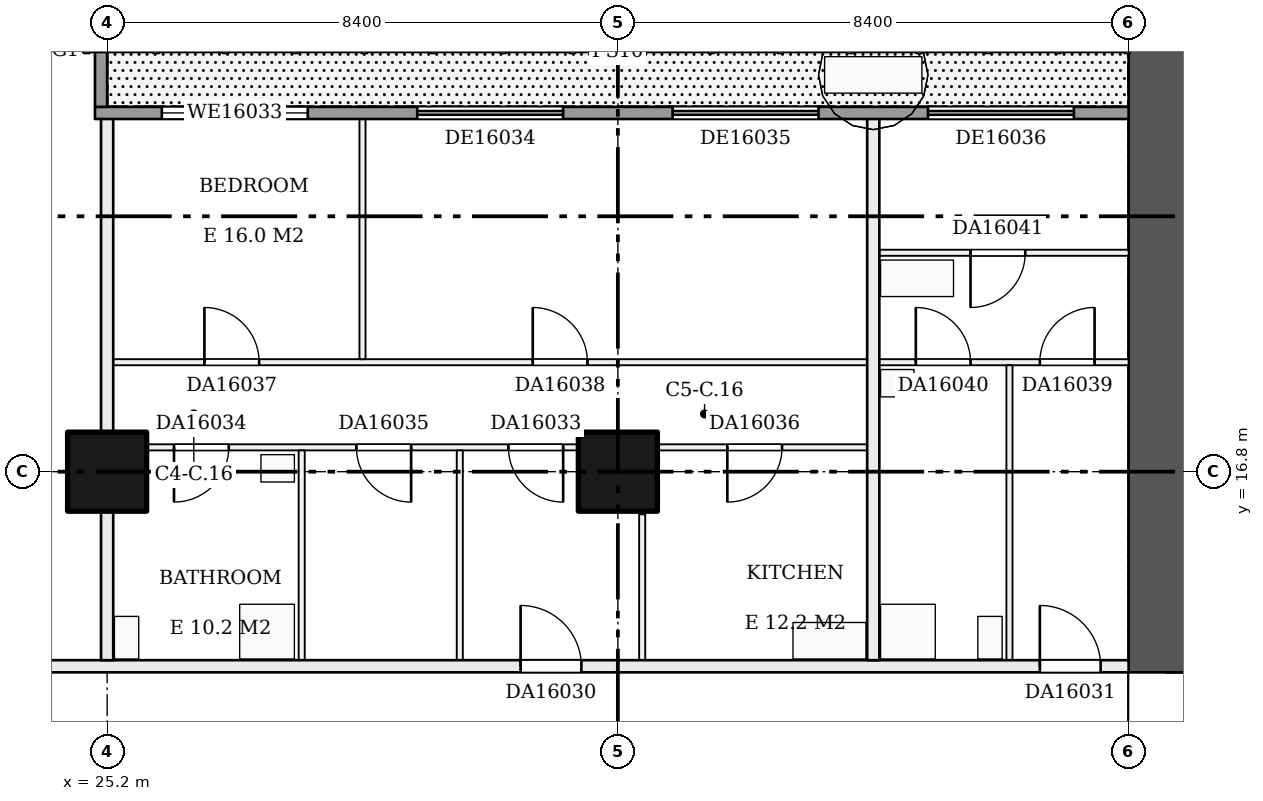
"""IFC4 building model, lengths in metres.
Left out: names, types, materials, properties, quantities, classifications, styles, units other than length and angle.
Written with IfcOpenShell. Run it as: python <this file> out.ifc"""

import sys

from ifc_helpers import new_model, si_unit, direction, frame, frame_2d, origin, origin_2d, place, context, subcontext, project, spatial, rectangle, extrude, element, fill, save


model = new_model("IFC4")
c1 = context("Model", 3, precision=1e-05, world=origin(), true_north=direction((0.0, 1.0)))
c2 = subcontext(c1, "Body", "Model", "MODEL_VIEW")
j1 = project(units=[si_unit("LENGTHUNIT", "METRE"), si_unit("PLANEANGLEUNIT", "RADIAN")], contexts=[c1])
p1 = place(None, origin())
s1 = spatial("IfcSite", under=j1, at=p1, CompositionType="ELEMENT")
p2 = place(p1, origin())
s2 = spatial("IfcBuilding", under=s1, at=p2, CompositionType="ELEMENT")
p3 = place(p2, frame((0.0, 0.0, 67.2)))
s3 = spatial("IfcBuildingStorey", under=s2, at=p3, CompositionType="ELEMENT", Elevation=67.2)
for number, where, z_axis, x_axis in (
    (1, (25.2, 16.8, 0.0), (0.0, 0.0, 1.0), (1.0, 0.0, 0.0)),
    (2, (33.6, 16.8, 0.0), (0.0, 0.0, 1.0), (1.0, 0.0, 0.0)),
):
    element("IfcColumn", number, at=place(p3, frame(where, z_axis=z_axis, x_axis=x_axis)), inside=s3, PredefinedType="COLUMN", context=c2, shape_type="SweptSolid", body=[
        extrude(rectangle(XDim=1.3, YDim=1.3, at=origin_2d()), origin(), (0.0, 0.0, 1.0), 3.22),
    ])
p4 = place(p3, frame((42.6, 9.6, 0.0), z_axis=(0.0, 0.0, 1.0), x_axis=(0.0, 1.0, 0.0)))
e3 = element("IfcWall", 3, at=p4, inside=s3, PredefinedType="SHEAR", context=c2, shape_type="SweptSolid", body=[
    extrude(rectangle(XDim=14.4, YDim=1.2, at=frame_2d((7.2, 0.0))), origin(), (0.0, 0.0, 1.0), 3.22),
])
p5 = place(p4, frame((2.1, 0.0, 0.0)))
e4 = element("IfcOpeningElement", 4, at=p5, cuts=e3, PredefinedType="OPENING", context=c2, shape_type="SweptSolid", body=[
    extrude(rectangle(XDim=1.8, YDim=2.1, at=frame_2d((0.9, 1.05))), frame((0.0, 0.61, 0.0), z_axis=(0.0, -1.0, 0.0), x_axis=(1.0, 0.0, 0.0)), (0.0, 0.0, 1.0), 1.22),
])
p6 = place(p3, frame((16.9, 13.6, 0.0), z_axis=(0.0, 0.0, 1.0), x_axis=(1.0, 0.0, 0.0)))
e5 = element("IfcWall", 5, at=p6, inside=s3, PredefinedType="PARTITIONING", context=c2, shape_type="SweptSolid", body=[
    extrude(rectangle(XDim=25.1, YDim=0.2, at=frame_2d((12.55, 0.0))), origin(), (0.0, 0.0, 1.0), 3.22),
])
p7 = place(p6, frame((15.1, 0.0, 0.0)))
e6 = element("IfcOpeningElement", 6, at=p7, cuts=e5, PredefinedType="OPENING", context=c2, shape_type="SweptSolid", body=[
    extrude(rectangle(XDim=1.0, YDim=2.1, at=frame_2d((0.5, 1.05))), frame((0.0, 0.11, 0.0), z_axis=(0.0, -1.0, 0.0), x_axis=(1.0, 0.0, 0.0)), (0.0, 0.0, 1.0), 0.22),
])
p8 = place(p6, frame((23.64, 0.0, 0.0)))
e7 = element("IfcOpeningElement", 7, at=p8, cuts=e5, PredefinedType="OPENING", context=c2, shape_type="SweptSolid", body=[
    extrude(rectangle(XDim=1.0, YDim=2.1, at=frame_2d((0.5, 1.05))), frame((0.0, 0.11, 0.0), z_axis=(0.0, -1.0, 0.0), x_axis=(1.0, 0.0, 0.0)), (0.0, 0.0, 1.0), 0.22),
])
p9 = place(p6, frame((5.2, 0.0, 0.0)))
e8 = element("IfcOpeningElement", 8, at=p9, cuts=e5, PredefinedType="OPENING", context=c2, shape_type="SweptSolid", body=[
    extrude(rectangle(XDim=1.0, YDim=2.1, at=frame_2d((0.5, 1.05))), frame((0.0, 0.11, 0.0), z_axis=(0.0, -1.0, 0.0), x_axis=(1.0, 0.0, 0.0)), (0.0, 0.0, 1.0), 0.22),
])
p10 = place(p3, frame((25.3, 17.2, 0.0), z_axis=(0.0, 0.0, 1.0), x_axis=(1.0, 0.0, 0.0)))
e9 = element("IfcWall", 9, at=p10, inside=s3, PredefinedType="PARTITIONING", context=c2, shape_type="SweptSolid", body=[
    extrude(rectangle(XDim=12.4, YDim=0.1, at=frame_2d((6.2, 0.0))), origin(), (0.0, 0.0, 1.0), 3.22),
])
p11 = place(p10, frame((6.5, 0.0, 0.0)))
e10 = element("IfcOpeningElement", 10, at=p11, cuts=e9, PredefinedType="OPENING", context=c2, shape_type="SweptSolid", body=[
    extrude(rectangle(XDim=0.9, YDim=2.1, at=frame_2d((0.45, 1.05))), frame((0.0, 0.06, 0.0), z_axis=(0.0, -1.0, 0.0), x_axis=(1.0, 0.0, 0.0)), (0.0, 0.0, 1.0), 0.12),
])
p12 = place(p10, frame((1.0, 0.0, 0.0)))
e11 = element("IfcOpeningElement", 11, at=p12, cuts=e9, PredefinedType="OPENING", context=c2, shape_type="SweptSolid", body=[
    extrude(rectangle(XDim=0.9, YDim=2.1, at=frame_2d((0.45, 1.05))), frame((0.0, 0.06, 0.0), z_axis=(0.0, -1.0, 0.0), x_axis=(1.0, 0.0, 0.0)), (0.0, 0.0, 1.0), 0.12),
])
p13 = place(p10, frame((4.0, 0.0, 0.0)))
e12 = element("IfcOpeningElement", 12, at=p13, cuts=e9, PredefinedType="OPENING", context=c2, shape_type="SweptSolid", body=[
    extrude(rectangle(XDim=0.9, YDim=2.1, at=frame_2d((0.45, 1.05))), frame((0.0, 0.06, 0.0), z_axis=(0.0, -1.0, 0.0), x_axis=(1.0, 0.0, 0.0)), (0.0, 0.0, 1.0), 0.12),
])
p14 = place(p10, frame((10.1, 0.0, 0.0)))
e13 = element("IfcOpeningElement", 13, at=p14, cuts=e9, PredefinedType="OPENING", context=c2, shape_type="SweptSolid", body=[
    extrude(rectangle(XDim=0.9, YDim=2.1, at=frame_2d((0.45, 1.05))), frame((0.0, 0.06, 0.0), z_axis=(0.0, -1.0, 0.0), x_axis=(1.0, 0.0, 0.0)), (0.0, 0.0, 1.0), 0.12),
])
p15 = place(p3, frame((25.3, 18.6, 0.0), z_axis=(0.0, 0.0, 1.0), x_axis=(1.0, 0.0, 0.0)))
e14 = element("IfcWall", 14, at=p15, inside=s3, PredefinedType="PARTITIONING", context=c2, shape_type="SweptSolid", body=[
    extrude(rectangle(XDim=16.7, YDim=0.1, at=frame_2d((8.35, 0.0))), origin(), (0.0, 0.0, 1.0), 3.22),
])
p16 = place(p15, frame((1.5, 0.0, 0.0)))
e15 = element("IfcOpeningElement", 15, at=p16, cuts=e14, PredefinedType="OPENING", context=c2, shape_type="SweptSolid", body=[
    extrude(rectangle(XDim=0.9, YDim=2.1, at=frame_2d((0.45, 1.05))), frame((0.0, 0.06, 0.0), z_axis=(0.0, -1.0, 0.0), x_axis=(1.0, 0.0, 0.0)), (0.0, 0.0, 1.0), 0.12),
])
p17 = place(p15, frame((6.9, 0.0, 0.0)))
e16 = element("IfcOpeningElement", 16, at=p17, cuts=e14, PredefinedType="OPENING", context=c2, shape_type="SweptSolid", body=[
    extrude(rectangle(XDim=0.9, YDim=2.1, at=frame_2d((0.45, 1.05))), frame((0.0, 0.06, 0.0), z_axis=(0.0, -1.0, 0.0), x_axis=(1.0, 0.0, 0.0)), (0.0, 0.0, 1.0), 0.12),
])
p18 = place(p15, frame((15.24, 0.0, 0.0)))
e17 = element("IfcOpeningElement", 17, at=p18, cuts=e14, PredefinedType="OPENING", context=c2, shape_type="SweptSolid", body=[
    extrude(rectangle(XDim=0.9, YDim=2.1, at=frame_2d((0.45, 1.05))), frame((0.0, 0.06, 0.0), z_axis=(0.0, -1.0, 0.0), x_axis=(1.0, 0.0, 0.0)), (0.0, 0.0, 1.0), 0.12),
])
p19 = place(p15, frame((13.2, 0.0, 0.0)))
e18 = element("IfcOpeningElement", 18, at=p19, cuts=e14, PredefinedType="OPENING", context=c2, shape_type="SweptSolid", body=[
    extrude(rectangle(XDim=0.9, YDim=2.1, at=frame_2d((0.45, 1.05))), frame((0.0, 0.06, 0.0), z_axis=(0.0, -1.0, 0.0), x_axis=(1.0, 0.0, 0.0)), (0.0, 0.0, 1.0), 0.12),
])
p20 = place(p3, frame((37.9, 20.4, 0.0), z_axis=(0.0, 0.0, 1.0), x_axis=(1.0, 0.0, 0.0)))
e19 = element("IfcWall", 19, at=p20, inside=s3, PredefinedType="PARTITIONING", context=c2, shape_type="SweptSolid", body=[
    extrude(rectangle(XDim=4.1, YDim=0.1, at=frame_2d((2.05, 0.0))), origin(), (0.0, 0.0, 1.0), 3.22),
])
p21 = place(p20, frame((1.5, 0.0, 0.0)))
e20 = element("IfcOpeningElement", 20, at=p21, cuts=e19, PredefinedType="OPENING", context=c2, shape_type="SweptSolid", body=[
    extrude(rectangle(XDim=0.9, YDim=2.1, at=frame_2d((0.45, 1.05))), frame((0.0, 0.06, 0.0), z_axis=(0.0, -1.0, 0.0), x_axis=(1.0, 0.0, 0.0)), (0.0, 0.0, 1.0), 0.12),
])
p22 = place(p3, frame((25.2, 13.7, 0.0), z_axis=(0.0, 0.0, 1.0), x_axis=(0.0, 1.0, 0.0)))
e21 = element("IfcWall", 21, at=p22, inside=s3, PredefinedType="PARTITIONING", context=c2, shape_type="SweptSolid", body=[
    extrude(rectangle(XDim=9.0, YDim=0.2, at=frame_2d((4.5, 0.0))), origin(), (0.0, 0.0, 1.0), 3.22),
])
p23 = place(p3, frame((28.4, 13.7, 0.0), z_axis=(0.0, 0.0, 1.0), x_axis=(0.0, 1.0, 0.0)))
e22 = element("IfcWall", 22, at=p23, inside=s3, PredefinedType="PARTITIONING", context=c2, shape_type="SweptSolid", body=[
    extrude(rectangle(XDim=3.45, YDim=0.1, at=frame_2d((1.725, 0.0))), origin(), (0.0, 0.0, 1.0), 3.22),
])
p24 = place(p3, frame((29.4, 18.65, 0.0), z_axis=(0.0, 0.0, 1.0), x_axis=(0.0, 1.0, 0.0)))
e23 = element("IfcWall", 23, at=p24, inside=s3, PredefinedType="PARTITIONING", context=c2, shape_type="SweptSolid", body=[
    extrude(rectangle(XDim=4.05, YDim=0.1, at=frame_2d((2.025, 0.0))), origin(), (0.0, 0.0, 1.0), 3.22),
])
p25 = place(p3, frame((31.0, 13.7, 0.0), z_axis=(0.0, 0.0, 1.0), x_axis=(0.0, 1.0, 0.0)))
e24 = element("IfcWall", 24, at=p25, inside=s3, PredefinedType="PARTITIONING", context=c2, shape_type="SweptSolid", body=[
    extrude(rectangle(XDim=3.45, YDim=0.1, at=frame_2d((1.725, 0.0))), origin(), (0.0, 0.0, 1.0), 3.22),
])
p26 = place(p3, frame((34.0, 13.7, 0.0), z_axis=(0.0, 0.0, 1.0), x_axis=(0.0, 1.0, 0.0)))
e25 = element("IfcWall", 25, at=p26, inside=s3, PredefinedType="PARTITIONING", context=c2, shape_type="SweptSolid", body=[
    extrude(rectangle(XDim=2.4, YDim=0.1, at=frame_2d((1.2, 0.0))), origin(), (0.0, 0.0, 1.0), 3.22),
])
p27 = place(p3, frame((37.8, 13.7, 0.0), z_axis=(0.0, 0.0, 1.0), x_axis=(0.0, 1.0, 0.0)))
e26 = element("IfcWall", 26, at=p27, inside=s3, PredefinedType="PARTITIONING", context=c2, shape_type="SweptSolid", body=[
    extrude(rectangle(XDim=9.0, YDim=0.2, at=frame_2d((4.5, 0.0))), origin(), (0.0, 0.0, 1.0), 3.22),
])
p28 = place(p3, frame((40.04, 13.7, 0.0), z_axis=(0.0, 0.0, 1.0), x_axis=(0.0, 1.0, 0.0)))
e27 = element("IfcWall", 27, at=p28, inside=s3, PredefinedType="PARTITIONING", context=c2, shape_type="SweptSolid", body=[
    extrude(rectangle(XDim=4.85, YDim=0.1, at=frame_2d((2.425, 0.0))), origin(), (0.0, 0.0, 1.0), 3.22),
])
p29 = place(p3, frame((42.0, 22.7, 0.0), z_axis=(0.0, 0.0, 1.0), x_axis=(-1.0, 0.0, 0.0)))
e28 = element("IfcWall", 28, at=p29, inside=s3, PredefinedType="SOLIDWALL", context=c2, shape_type="SweptSolid", body=[
    extrude(rectangle(XDim=17.0, YDim=0.2, at=frame_2d((8.5, 0.0))), origin(), (0.0, 0.0, 1.0), 3.22),
])
p30 = place(p29, frame((13.5, 0.0, 0.9)))
e29 = element("IfcOpeningElement", 29, at=p30, cuts=e28, PredefinedType="OPENING", context=c2, shape_type="SweptSolid", body=[
    extrude(rectangle(XDim=2.4, YDim=1.5, at=frame_2d((1.2, 0.75))), frame((0.0, 0.11, 0.0), z_axis=(0.0, -1.0, 0.0), x_axis=(1.0, 0.0, 0.0)), (0.0, 0.0, 1.0), 0.22),
])
p31 = place(p29, frame((9.3, 0.0, 0.0)))
e30 = element("IfcOpeningElement", 30, at=p31, cuts=e28, PredefinedType="OPENING", context=c2, shape_type="SweptSolid", body=[
    extrude(rectangle(XDim=2.4, YDim=2.2, at=frame_2d((1.2, 1.1))), frame((0.0, 0.11, 0.0), z_axis=(0.0, -1.0, 0.0), x_axis=(1.0, 0.0, 0.0)), (0.0, 0.0, 1.0), 0.22),
])
p32 = place(p29, frame((5.1, 0.0, 0.0)))
e31 = element("IfcOpeningElement", 31, at=p32, cuts=e28, PredefinedType="OPENING", context=c2, shape_type="SweptSolid", body=[
    extrude(rectangle(XDim=2.4, YDim=2.2, at=frame_2d((1.2, 1.1))), frame((0.0, 0.11, 0.0), z_axis=(0.0, -1.0, 0.0), x_axis=(1.0, 0.0, 0.0)), (0.0, 0.0, 1.0), 0.22),
])
p33 = place(p29, frame((0.9, 0.0, 0.0)))
e32 = element("IfcOpeningElement", 32, at=p33, cuts=e28, PredefinedType="OPENING", context=c2, shape_type="SweptSolid", body=[
    extrude(rectangle(XDim=2.4, YDim=2.2, at=frame_2d((1.2, 1.1))), frame((0.0, 0.11, 0.0), z_axis=(0.0, -1.0, 0.0), x_axis=(1.0, 0.0, 0.0)), (0.0, 0.0, 1.0), 0.22),
])
p34 = place(p3, frame((25.1, 22.8, 0.0), z_axis=(0.0, 0.0, 1.0), x_axis=(0.0, 1.0, 0.0)))
e33 = element("IfcWall", 33, at=p34, inside=s3, PredefinedType="SOLIDWALL", context=c2, shape_type="SweptSolid", body=[
    extrude(rectangle(XDim=1.7, YDim=0.2, at=frame_2d((0.85, 0.0))), origin(), (0.0, 0.0, 1.0), 3.22),
])
p35 = place(p5, frame((1.8, 0.0, 0.0), z_axis=(0.0, 0.0, 1.0), x_axis=(-1.0, 0.0, 0.0)))
e34 = element("IfcDoor", 34, at=p35, inside=s3, OperationType="DOUBLE_DOOR_SINGLE_SWING", PredefinedType="DOOR", context=c2, shape_type="SweptSolid", body=[
    extrude(rectangle(XDim=1.8, YDim=2.1, at=frame_2d((0.9, 1.05))), frame((0.0, 0.025, 0.0), z_axis=(0.0, -1.0, 0.0), x_axis=(1.0, 0.0, 0.0)), (0.0, 0.0, 1.0), 0.05),
])
fill(e4, e34)
p36 = place(p7, origin())
e35 = element("IfcDoor", 35, at=p36, inside=s3, OperationType="SINGLE_SWING_LEFT", PredefinedType="DOOR", context=c2, shape_type="SweptSolid", body=[
    extrude(rectangle(XDim=1.0, YDim=2.1, at=frame_2d((0.5, 1.05))), frame((0.0, 0.025, 0.0), z_axis=(0.0, -1.0, 0.0), x_axis=(1.0, 0.0, 0.0)), (0.0, 0.0, 1.0), 0.05),
])
fill(e6, e35)
p37 = place(p8, origin())
e36 = element("IfcDoor", 36, at=p37, inside=s3, OperationType="SINGLE_SWING_LEFT", PredefinedType="DOOR", context=c2, shape_type="SweptSolid", body=[
    extrude(rectangle(XDim=1.0, YDim=2.1, at=frame_2d((0.5, 1.05))), frame((0.0, 0.025, 0.0), z_axis=(0.0, -1.0, 0.0), x_axis=(1.0, 0.0, 0.0)), (0.0, 0.0, 1.0), 0.05),
])
fill(e7, e36)
p38 = place(p11, frame((0.9, 0.0, 0.0), z_axis=(0.0, 0.0, 1.0), x_axis=(-1.0, 0.0, 0.0)))
e37 = element("IfcDoor", 37, at=p38, inside=s3, OperationType="SINGLE_SWING_LEFT", PredefinedType="DOOR", context=c2, shape_type="SweptSolid", body=[
    extrude(rectangle(XDim=0.9, YDim=2.1, at=frame_2d((0.45, 1.05))), frame((0.0, 0.025, 0.0), z_axis=(0.0, -1.0, 0.0), x_axis=(1.0, 0.0, 0.0)), (0.0, 0.0, 1.0), 0.05),
])
fill(e10, e37)
p39 = place(p12, frame((0.9, 0.0, 0.0), z_axis=(0.0, 0.0, 1.0), x_axis=(-1.0, 0.0, 0.0)))
e38 = element("IfcDoor", 38, at=p39, inside=s3, OperationType="SINGLE_SWING_RIGHT", PredefinedType="DOOR", context=c2, shape_type="SweptSolid", body=[
    extrude(rectangle(XDim=0.9, YDim=2.1, at=frame_2d((0.45, 1.05))), frame((0.0, 0.025, 0.0), z_axis=(0.0, -1.0, 0.0), x_axis=(1.0, 0.0, 0.0)), (0.0, 0.0, 1.0), 0.05),
])
fill(e11, e38)
p40 = place(p13, frame((0.9, 0.0, 0.0), z_axis=(0.0, 0.0, 1.0), x_axis=(-1.0, 0.0, 0.0)))
e39 = element("IfcDoor", 39, at=p40, inside=s3, OperationType="SINGLE_SWING_LEFT", PredefinedType="DOOR", context=c2, shape_type="SweptSolid", body=[
    extrude(rectangle(XDim=0.9, YDim=2.1, at=frame_2d((0.45, 1.05))), frame((0.0, 0.025, 0.0), z_axis=(0.0, -1.0, 0.0), x_axis=(1.0, 0.0, 0.0)), (0.0, 0.0, 1.0), 0.05),
])
fill(e12, e39)
p41 = place(p14, frame((0.9, 0.0, 0.0), z_axis=(0.0, 0.0, 1.0), x_axis=(-1.0, 0.0, 0.0)))
e40 = element("IfcDoor", 40, at=p41, inside=s3, OperationType="SINGLE_SWING_RIGHT", PredefinedType="DOOR", context=c2, shape_type="SweptSolid", body=[
    extrude(rectangle(XDim=0.9, YDim=2.1, at=frame_2d((0.45, 1.05))), frame((0.0, 0.025, 0.0), z_axis=(0.0, -1.0, 0.0), x_axis=(1.0, 0.0, 0.0)), (0.0, 0.0, 1.0), 0.05),
])
fill(e13, e40)
p42 = place(p16, origin())
e41 = element("IfcDoor", 41, at=p42, inside=s3, OperationType="SINGLE_SWING_LEFT", PredefinedType="DOOR", context=c2, shape_type="SweptSolid", body=[
    extrude(rectangle(XDim=0.9, YDim=2.1, at=frame_2d((0.45, 1.05))), frame((0.0, 0.025, 0.0), z_axis=(0.0, -1.0, 0.0), x_axis=(1.0, 0.0, 0.0)), (0.0, 0.0, 1.0), 0.05),
])
fill(e15, e41)
p43 = place(p17, origin())
e42 = element("IfcDoor", 42, at=p43, inside=s3, OperationType="SINGLE_SWING_LEFT", PredefinedType="DOOR", context=c2, shape_type="SweptSolid", body=[
    extrude(rectangle(XDim=0.9, YDim=2.1, at=frame_2d((0.45, 1.05))), frame((0.0, 0.025, 0.0), z_axis=(0.0, -1.0, 0.0), x_axis=(1.0, 0.0, 0.0)), (0.0, 0.0, 1.0), 0.05),
])
fill(e16, e42)
p44 = place(p18, origin())
e43 = element("IfcDoor", 43, at=p44, inside=s3, OperationType="SINGLE_SWING_RIGHT", PredefinedType="DOOR", context=c2, shape_type="SweptSolid", body=[
    extrude(rectangle(XDim=0.9, YDim=2.1, at=frame_2d((0.45, 1.05))), frame((0.0, 0.025, 0.0), z_axis=(0.0, -1.0, 0.0), x_axis=(1.0, 0.0, 0.0)), (0.0, 0.0, 1.0), 0.05),
])
fill(e17, e43)
p45 = place(p19, origin())
e44 = element("IfcDoor", 44, at=p45, inside=s3, OperationType="SINGLE_SWING_LEFT", PredefinedType="DOOR", context=c2, shape_type="SweptSolid", body=[
    extrude(rectangle(XDim=0.9, YDim=2.1, at=frame_2d((0.45, 1.05))), frame((0.0, 0.025, 0.0), z_axis=(0.0, -1.0, 0.0), x_axis=(1.0, 0.0, 0.0)), (0.0, 0.0, 1.0), 0.05),
])
fill(e18, e44)
p46 = place(p21, frame((0.9, 0.0, 0.0), z_axis=(0.0, 0.0, 1.0), x_axis=(-1.0, 0.0, 0.0)))
e45 = element("IfcDoor", 45, at=p46, inside=s3, OperationType="SINGLE_SWING_RIGHT", PredefinedType="DOOR", context=c2, shape_type="SweptSolid", body=[
    extrude(rectangle(XDim=0.9, YDim=2.1, at=frame_2d((0.45, 1.05))), frame((0.0, 0.025, 0.0), z_axis=(0.0, -1.0, 0.0), x_axis=(1.0, 0.0, 0.0)), (0.0, 0.0, 1.0), 0.05),
])
fill(e20, e45)
p47 = place(p30, origin())
e46 = element("IfcWindow", 46, at=p47, inside=s3, PartitioningType="SINGLE_PANEL", PredefinedType="WINDOW", context=c2, shape_type="SweptSolid", body=[
    extrude(rectangle(XDim=2.4, YDim=1.5, at=frame_2d((1.2, 0.75))), frame((0.0, 0.03, 0.0), z_axis=(0.0, -1.0, 0.0), x_axis=(1.0, 0.0, 0.0)), (0.0, 0.0, 1.0), 0.06),
])
fill(e29, e46)
p48 = place(p31, origin())
e47 = element("IfcDoor", 47, at=p48, inside=s3, OperationType="DOUBLE_DOOR_SLIDING", PredefinedType="DOOR", context=c2, shape_type="SweptSolid", body=[
    extrude(rectangle(XDim=2.4, YDim=2.2, at=frame_2d((1.2, 1.1))), frame((0.0, 0.025, 0.0), z_axis=(0.0, -1.0, 0.0), x_axis=(1.0, 0.0, 0.0)), (0.0, 0.0, 1.0), 0.05),
])
fill(e30, e47)
p49 = place(p32, origin())
e48 = element("IfcDoor", 48, at=p49, inside=s3, OperationType="DOUBLE_DOOR_SLIDING", PredefinedType="DOOR", context=c2, shape_type="SweptSolid", body=[
    extrude(rectangle(XDim=2.4, YDim=2.2, at=frame_2d((1.2, 1.1))), frame((0.0, 0.025, 0.0), z_axis=(0.0, -1.0, 0.0), x_axis=(1.0, 0.0, 0.0)), (0.0, 0.0, 1.0), 0.05),
])
fill(e31, e48)
p50 = place(p33, origin())
e49 = element("IfcDoor", 49, at=p50, inside=s3, OperationType="DOUBLE_DOOR_SLIDING", PredefinedType="DOOR", context=c2, shape_type="SweptSolid", body=[
    extrude(rectangle(XDim=2.4, YDim=2.2, at=frame_2d((1.2, 1.1))), frame((0.0, 0.025, 0.0), z_axis=(0.0, -1.0, 0.0), x_axis=(1.0, 0.0, 0.0)), (0.0, 0.0, 1.0), 0.05),
])
fill(e32, e49)
save(model, sys.argv[1])
